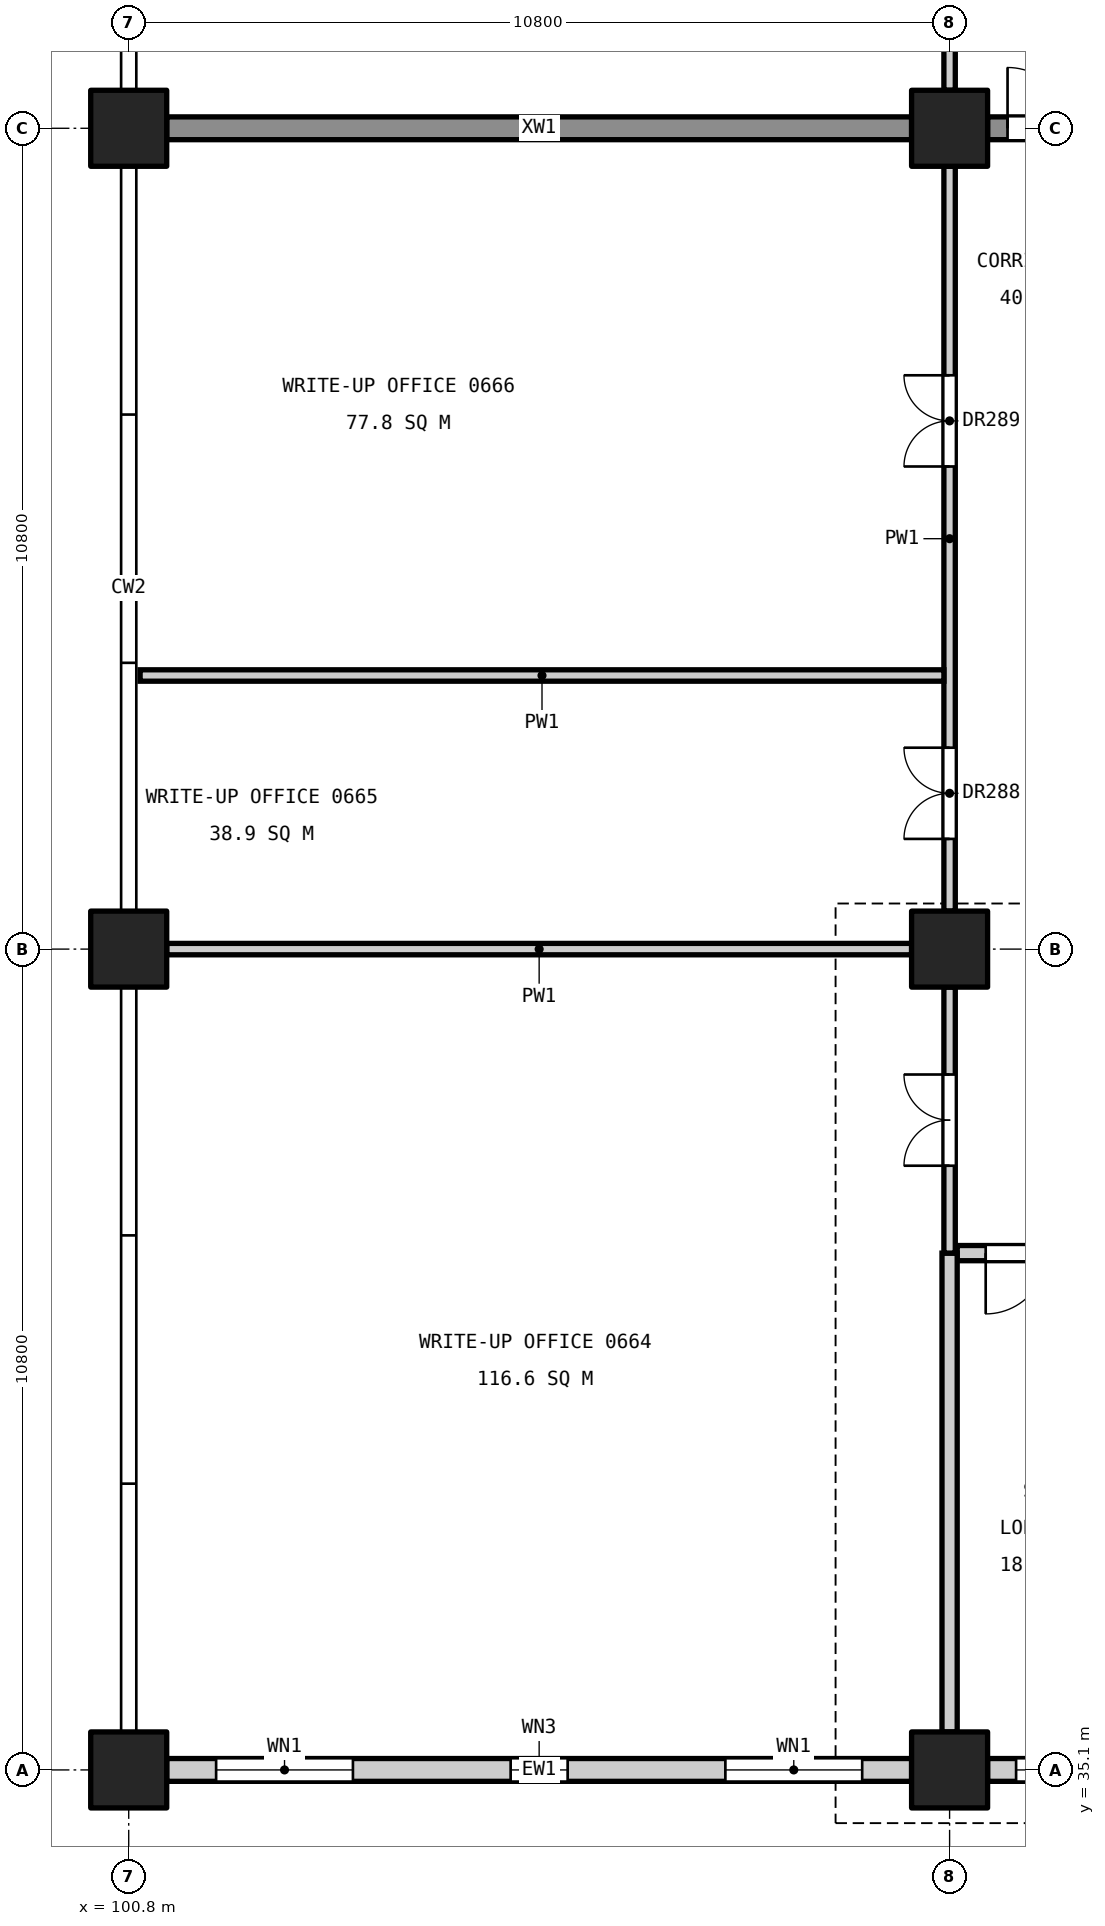
"""IFC4 building model, lengths in metres.
Left out: names, types, materials, properties, quantities, classifications, styles, units other than length and angle.
Written with IfcOpenShell. Run it as: python <this file> out.ifc"""

import sys

from ifc_helpers import new_model, si_unit, direction, frame, frame_2d, origin, origin_2d, place, context, subcontext, project, spatial, rectangle, extrude, element, fill, save


model = new_model("IFC4")
c1 = context("Model", 3, precision=1e-05, world=origin(), true_north=direction((0.0, 1.0)))
c2 = subcontext(c1, "Body", "Model", "MODEL_VIEW")
j1 = project(units=[si_unit("LENGTHUNIT", "METRE"), si_unit("PLANEANGLEUNIT", "RADIAN")], contexts=[c1])
p1 = place(None, origin())
s1 = spatial("IfcSite", under=j1, at=p1, CompositionType="ELEMENT")
p2 = place(p1, origin())
s2 = spatial("IfcBuilding", under=s1, at=p2, CompositionType="ELEMENT")
p3 = place(p2, frame((0.0, 0.0, 31.8)))
s3 = spatial("IfcBuildingStorey", under=s2, at=p3, CompositionType="ELEMENT", Elevation=31.8)
for number, where, z_axis, x_axis in (
    (1, (111.6, 35.1, 0.0), (0.0, 0.0, 1.0), (1.0, 0.0, 0.0)),
    (2, (111.6, 45.9, 0.0), (0.0, 0.0, 1.0), (1.0, 0.0, 0.0)),
    (3, (111.6, 56.7, 0.0), (0.0, 0.0, 1.0), (1.0, 0.0, 0.0)),
    (4, (100.8, 35.1, 0.0), (0.0, 0.0, 1.0), (1.0, 0.0, 0.0)),
    (5, (100.8, 45.9, 0.0), (0.0, 0.0, 1.0), (1.0, 0.0, 0.0)),
    (6, (100.8, 56.7, 0.0), (0.0, 0.0, 1.0), (1.0, 0.0, 0.0)),
):
    element("IfcColumn", number, at=place(p3, frame(where, z_axis=z_axis, x_axis=x_axis)), inside=s3, PredefinedType="COLUMN", context=c2, shape_type="SweptSolid", body=[
        extrude(rectangle(XDim=1.0, YDim=1.0, at=origin_2d()), origin(), (0.0, 0.0, 1.0), 4.8),
    ])
p4 = place(p3, frame((118.3, 56.7, 0.0), z_axis=(0.0, 0.0, 1.0), x_axis=(-1.0, 0.0, 0.0)))
e7 = element("IfcWall", 7, at=p4, inside=s3, PredefinedType="SHEAR", context=c2, shape_type="SweptSolid", body=[
    extrude(rectangle(XDim=6.2, YDim=0.3, at=frame_2d((3.1, 0.0))), origin(), (0.0, 0.0, 1.0), 4.55),
])
p5 = place(p4, frame((4.337, 0.0, 0.0)))
e8 = element("IfcOpeningElement", 8, at=p5, cuts=e7, PredefinedType="OPENING", context=c2, shape_type="SweptSolid", body=[
    extrude(rectangle(XDim=1.6, YDim=2.1, at=frame_2d((0.8, 1.05))), frame((0.0, 0.16, 0.0), z_axis=(0.0, -1.0, 0.0), x_axis=(1.0, 0.0, 0.0)), (0.0, 0.0, 1.0), 0.32),
])
p6 = place(p3, frame((111.1, 56.7, 0.0), z_axis=(0.0, 0.0, 1.0), x_axis=(-1.0, 0.0, 0.0)))
e9 = element("IfcWall", 9, at=p6, inside=s3, PredefinedType="SHEAR", context=c2, shape_type="SweptSolid", body=[
    extrude(rectangle(XDim=9.8, YDim=0.3, at=frame_2d((4.9, 0.0))), origin(), (0.0, 0.0, 1.0), 4.55),
])
p7 = place(p3, frame((114.05, 35.1, 0.0), z_axis=(0.0, 0.0, 1.0), x_axis=(-1.0, 0.0, 0.0)))
e10 = element("IfcWall", 10, at=p7, inside=s3, PredefinedType="STANDARD", context=c2, shape_type="SweptSolid", body=[
    extrude(rectangle(XDim=1.95, YDim=0.3, at=frame_2d((0.975, 0.0))), origin(), (0.0, 0.0, 1.0), 3.85),
])
p8 = place(p7, frame((0.375, 0.0, 0.9)))
e11 = element("IfcOpeningElement", 11, at=p8, cuts=e10, PredefinedType="OPENING", context=c2, shape_type="SweptSolid", body=[
    extrude(rectangle(XDim=1.2, YDim=2.4, at=frame_2d((0.6, 1.2))), frame((0.0, 0.16, 0.0), z_axis=(0.0, -1.0, 0.0), x_axis=(1.0, 0.0, 0.0)), (0.0, 0.0, 1.0), 0.32),
])
p9 = place(p3, frame((111.1, 35.1, 0.0), z_axis=(0.0, 0.0, 1.0), x_axis=(-1.0, 0.0, 0.0)))
e12 = element("IfcWall", 12, at=p9, inside=s3, PredefinedType="STANDARD", context=c2, shape_type="SweptSolid", body=[
    extrude(rectangle(XDim=9.8, YDim=0.3, at=frame_2d((4.9, 0.0))), origin(), (0.0, 0.0, 1.0), 3.85),
])
p10 = place(p9, frame((0.65, 0.0, 0.9)))
e13 = element("IfcOpeningElement", 13, at=p10, cuts=e12, PredefinedType="OPENING", context=c2, shape_type="SweptSolid", body=[
    extrude(rectangle(XDim=1.8, YDim=2.4, at=frame_2d((0.9, 1.2))), frame((0.0, 0.16, 0.0), z_axis=(0.0, -1.0, 0.0), x_axis=(1.0, 0.0, 0.0)), (0.0, 0.0, 1.0), 0.32),
])
p11 = place(p9, frame((4.525, 0.0, 0.8)))
e14 = element("IfcOpeningElement", 14, at=p11, cuts=e12, PredefinedType="OPENING", context=c2, shape_type="SweptSolid", body=[
    extrude(rectangle(XDim=0.75, YDim=1.2, at=frame_2d((0.375, 0.6))), frame((0.0, 0.16, 0.0), z_axis=(0.0, -1.0, 0.0), x_axis=(1.0, 0.0, 0.0)), (0.0, 0.0, 1.0), 0.32),
])
p12 = place(p9, frame((7.35, 0.0, 0.9)))
e15 = element("IfcOpeningElement", 15, at=p12, cuts=e12, PredefinedType="OPENING", context=c2, shape_type="SweptSolid", body=[
    extrude(rectangle(XDim=1.8, YDim=2.4, at=frame_2d((0.9, 1.2))), frame((0.0, 0.16, 0.0), z_axis=(0.0, -1.0, 0.0), x_axis=(1.0, 0.0, 0.0)), (0.0, 0.0, 1.0), 0.32),
])
p13 = place(p3, frame((114.05, 41.9, 0.0), z_axis=(0.0, 0.0, 1.0), x_axis=(-1.0, 0.0, 0.0)))
e16 = element("IfcWall", 16, at=p13, inside=s3, PredefinedType="PARTITIONING", context=c2, shape_type="SweptSolid", body=[
    extrude(rectangle(XDim=2.35, YDim=0.2, at=frame_2d((1.175, 0.0))), origin(), (0.0, 0.0, 1.0), 3.55),
])
p14 = place(p13, frame((0.375, 0.0, 0.0)))
e17 = element("IfcOpeningElement", 17, at=p14, cuts=e16, PredefinedType="OPENING", context=c2, shape_type="SweptSolid", body=[
    extrude(rectangle(XDim=1.6, YDim=2.1, at=frame_2d((0.8, 1.05))), frame((0.0, 0.11, 0.0), z_axis=(0.0, -1.0, 0.0), x_axis=(1.0, 0.0, 0.0)), (0.0, 0.0, 1.0), 0.22),
])
p15 = place(p3, frame((111.6, 35.6, 0.0), z_axis=(0.0, 0.0, 1.0), x_axis=(0.0, 1.0, 0.0)))
e18 = element("IfcWall", 18, at=p15, inside=s3, PredefinedType="PARTITIONING", context=c2, shape_type="SweptSolid", body=[
    extrude(rectangle(XDim=6.3, YDim=0.2, at=frame_2d((3.15, 0.0))), origin(), (0.0, 0.0, 1.0), 3.55),
])
p16 = place(p3, frame((111.6, 41.9, 0.0), z_axis=(0.0, 0.0, 1.0), x_axis=(0.0, 1.0, 0.0)))
e19 = element("IfcWall", 19, at=p16, inside=s3, PredefinedType="PARTITIONING", context=c2, shape_type="SweptSolid", body=[
    extrude(rectangle(XDim=3.5, YDim=0.15, at=frame_2d((1.75, 0.0))), origin(), (0.0, 0.0, 1.0), 3.55),
])
p17 = place(p16, frame((1.15, 0.0, 0.0)))
e20 = element("IfcOpeningElement", 20, at=p17, cuts=e19, PredefinedType="OPENING", context=c2, shape_type="SweptSolid", body=[
    extrude(rectangle(XDim=1.2, YDim=2.1, at=frame_2d((0.6, 1.05))), frame((0.0, 0.085, 0.0), z_axis=(0.0, -1.0, 0.0), x_axis=(1.0, 0.0, 0.0)), (0.0, 0.0, 1.0), 0.17),
])
p18 = place(p3, frame((111.6, 46.4, 0.0), z_axis=(0.0, 0.0, 1.0), x_axis=(0.0, 1.0, 0.0)))
e21 = element("IfcWall", 21, at=p18, inside=s3, PredefinedType="PARTITIONING", context=c2, shape_type="SweptSolid", body=[
    extrude(rectangle(XDim=9.8, YDim=0.15, at=frame_2d((4.9, 0.0))), origin(), (0.0, 0.0, 1.0), 3.55),
])
p19 = place(p18, frame((0.95, 0.0, 0.0)))
e22 = element("IfcOpeningElement", 22, at=p19, cuts=e21, PredefinedType="OPENING", context=c2, shape_type="SweptSolid", body=[
    extrude(rectangle(XDim=1.2, YDim=2.1, at=frame_2d((0.6, 1.05))), frame((0.0, 0.085, 0.0), z_axis=(0.0, -1.0, 0.0), x_axis=(1.0, 0.0, 0.0)), (0.0, 0.0, 1.0), 0.17),
])
p20 = place(p18, frame((5.85, 0.0, 0.0)))
e23 = element("IfcOpeningElement", 23, at=p20, cuts=e21, PredefinedType="OPENING", context=c2, shape_type="SweptSolid", body=[
    extrude(rectangle(XDim=1.2, YDim=2.1, at=frame_2d((0.6, 1.05))), frame((0.0, 0.085, 0.0), z_axis=(0.0, -1.0, 0.0), x_axis=(1.0, 0.0, 0.0)), (0.0, 0.0, 1.0), 0.17),
])
p21 = place(p3, frame((111.6, 57.2, 0.0), z_axis=(0.0, 0.0, 1.0), x_axis=(0.0, 1.0, 0.0)))
e24 = element("IfcWall", 24, at=p21, inside=s3, PredefinedType="PARTITIONING", context=c2, shape_type="SweptSolid", body=[
    extrude(rectangle(XDim=3.1, YDim=0.15, at=frame_2d((1.55, 0.0))), origin(), (0.0, 0.0, 1.0), 3.55),
])
p22 = place(p21, frame((0.95, 0.0, 0.0)))
e25 = element("IfcOpeningElement", 25, at=p22, cuts=e24, PredefinedType="OPENING", context=c2, shape_type="SweptSolid", body=[
    extrude(rectangle(XDim=1.2, YDim=2.1, at=frame_2d((0.6, 1.05))), frame((0.0, 0.085, 0.0), z_axis=(0.0, -1.0, 0.0), x_axis=(1.0, 0.0, 0.0)), (0.0, 0.0, 1.0), 0.17),
])
p23 = place(p3, frame((111.1, 45.9, 0.0), z_axis=(0.0, 0.0, 1.0), x_axis=(-1.0, 0.0, 0.0)))
e26 = element("IfcWall", 26, at=p23, inside=s3, PredefinedType="PARTITIONING", context=c2, shape_type="SweptSolid", body=[
    extrude(rectangle(XDim=9.8, YDim=0.15, at=frame_2d((4.9, 0.0))), origin(), (0.0, 0.0, 1.0), 3.85),
])
p24 = place(p3, frame((111.525, 49.5, 0.0), z_axis=(0.0, 0.0, 1.0), x_axis=(-1.0, 0.0, 0.0)))
e27 = element("IfcWall", 27, at=p24, inside=s3, PredefinedType="PARTITIONING", context=c2, shape_type="SweptSolid", body=[
    extrude(rectangle(XDim=10.575, YDim=0.15, at=frame_2d((5.288, 0.0))), origin(), (0.0, 0.0, 1.0), 3.85),
])
p25 = place(p8, origin())
e28 = element("IfcWindow", 28, at=p25, inside=s3, PartitioningType="SINGLE_PANEL", PredefinedType="WINDOW", context=c2, shape_type="SweptSolid", body=[
    extrude(rectangle(XDim=1.2, YDim=2.4, at=frame_2d((0.6, 1.2))), frame((0.0, 0.03, 0.0), z_axis=(0.0, -1.0, 0.0), x_axis=(1.0, 0.0, 0.0)), (0.0, 0.0, 1.0), 0.06),
])
fill(e11, e28)
p26 = place(p10, origin())
e29 = element("IfcWindow", 29, at=p26, inside=s3, PartitioningType="SINGLE_PANEL", PredefinedType="WINDOW", context=c2, shape_type="SweptSolid", body=[
    extrude(rectangle(XDim=1.8, YDim=2.4, at=frame_2d((0.9, 1.2))), frame((0.0, 0.03, 0.0), z_axis=(0.0, -1.0, 0.0), x_axis=(1.0, 0.0, 0.0)), (0.0, 0.0, 1.0), 0.06),
])
fill(e13, e29)
p27 = place(p11, origin())
e30 = element("IfcWindow", 30, at=p27, inside=s3, PartitioningType="SINGLE_PANEL", PredefinedType="WINDOW", context=c2, shape_type="SweptSolid", body=[
    extrude(rectangle(XDim=0.75, YDim=1.2, at=frame_2d((0.375, 0.6))), frame((0.0, 0.03, 0.0), z_axis=(0.0, -1.0, 0.0), x_axis=(1.0, 0.0, 0.0)), (0.0, 0.0, 1.0), 0.06),
])
fill(e14, e30)
p28 = place(p12, origin())
e31 = element("IfcWindow", 31, at=p28, inside=s3, PartitioningType="SINGLE_PANEL", PredefinedType="WINDOW", context=c2, shape_type="SweptSolid", body=[
    extrude(rectangle(XDim=1.8, YDim=2.4, at=frame_2d((0.9, 1.2))), frame((0.0, 0.03, 0.0), z_axis=(0.0, -1.0, 0.0), x_axis=(1.0, 0.0, 0.0)), (0.0, 0.0, 1.0), 0.06),
])
fill(e15, e31)
p29 = place(p17, origin())
e32 = element("IfcDoor", 32, at=p29, inside=s3, OperationType="DOUBLE_DOOR_SINGLE_SWING", PredefinedType="DOOR", context=c2, shape_type="SweptSolid", body=[
    extrude(rectangle(XDim=1.2, YDim=2.1, at=frame_2d((0.6, 1.05))), frame((0.0, 0.025, 0.0), z_axis=(0.0, -1.0, 0.0), x_axis=(1.0, 0.0, 0.0)), (0.0, 0.0, 1.0), 0.05),
])
fill(e20, e32)
p30 = place(p19, origin())
e33 = element("IfcDoor", 33, at=p30, inside=s3, OperationType="DOUBLE_DOOR_SINGLE_SWING", PredefinedType="DOOR", context=c2, shape_type="SweptSolid", body=[
    extrude(rectangle(XDim=1.2, YDim=2.1, at=frame_2d((0.6, 1.05))), frame((0.0, 0.025, 0.0), z_axis=(0.0, -1.0, 0.0), x_axis=(1.0, 0.0, 0.0)), (0.0, 0.0, 1.0), 0.05),
])
fill(e22, e33)
p31 = place(p20, origin())
e34 = element("IfcDoor", 34, at=p31, inside=s3, OperationType="DOUBLE_DOOR_SINGLE_SWING", PredefinedType="DOOR", context=c2, shape_type="SweptSolid", body=[
    extrude(rectangle(XDim=1.2, YDim=2.1, at=frame_2d((0.6, 1.05))), frame((0.0, 0.025, 0.0), z_axis=(0.0, -1.0, 0.0), x_axis=(1.0, 0.0, 0.0)), (0.0, 0.0, 1.0), 0.05),
])
fill(e23, e34)
p32 = place(p14, origin())
e35 = element("IfcDoor", 35, at=p32, inside=s3, OperationType="DOUBLE_DOOR_SINGLE_SWING", PredefinedType="DOOR", context=c2, shape_type="SweptSolid", body=[
    extrude(rectangle(XDim=1.6, YDim=2.1, at=frame_2d((0.8, 1.05))), frame((0.0, 0.025, 0.0), z_axis=(0.0, -1.0, 0.0), x_axis=(1.0, 0.0, 0.0)), (0.0, 0.0, 1.0), 0.05),
])
fill(e17, e35)
p33 = place(p5, frame((1.6, 0.0, 0.0), z_axis=(0.0, 0.0, 1.0), x_axis=(-1.0, 0.0, 0.0)))
e36 = element("IfcDoor", 36, at=p33, inside=s3, OperationType="DOUBLE_DOOR_SINGLE_SWING", PredefinedType="DOOR", context=c2, shape_type="SweptSolid", body=[
    extrude(rectangle(XDim=1.6, YDim=2.1, at=frame_2d((0.8, 1.05))), frame((0.0, 0.025, 0.0), z_axis=(0.0, -1.0, 0.0), x_axis=(1.0, 0.0, 0.0)), (0.0, 0.0, 1.0), 0.05),
])
fill(e8, e36)
save(model, sys.argv[1])
